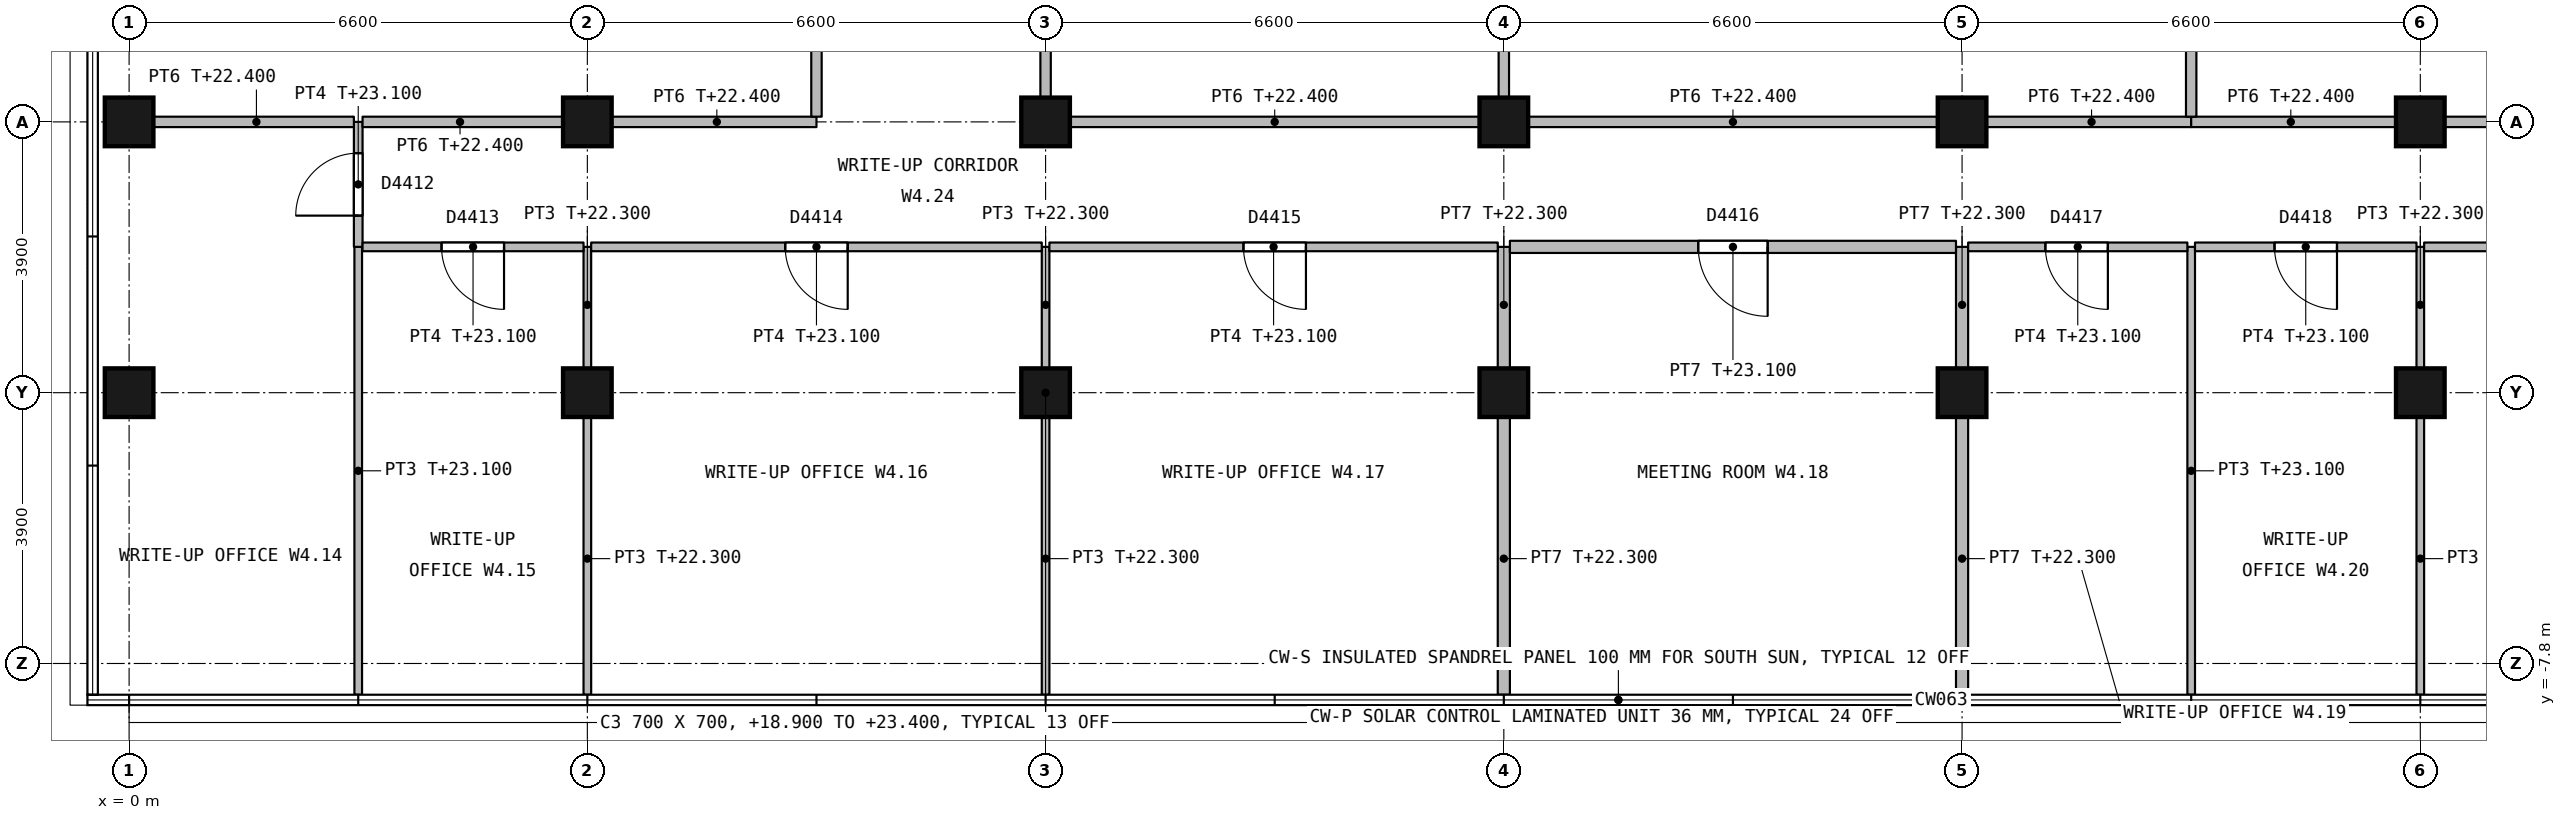
"""IFC4 building model, lengths in metres.
Left out: names, types, materials, properties, quantities, classifications, styles, units other than length and angle.
Written with IfcOpenShell. Run it as: python <this file> out.ifc"""

import sys

from ifc_helpers import new_model, si_unit, direction, frame, frame_2d, origin, origin_2d, place, context, subcontext, project, spatial, rectangle, extrude, element, fill, save


model = new_model("IFC4")
c1 = context("Model", 3, precision=1e-05, world=origin(), true_north=direction((0.0, 1.0)))
c2 = subcontext(c1, "Body", "Model", "MODEL_VIEW")
j1 = project(units=[si_unit("LENGTHUNIT", "METRE"), si_unit("PLANEANGLEUNIT", "RADIAN")], contexts=[c1])
p1 = place(None, origin())
s1 = spatial("IfcSite", under=j1, at=p1, CompositionType="ELEMENT")
p2 = place(p1, origin())
s2 = spatial("IfcBuilding", under=s1, at=p2, CompositionType="ELEMENT")
p3 = place(p2, frame((0.0, 0.0, 18.9)))
s3 = spatial("IfcBuildingStorey", under=s2, at=p3, CompositionType="ELEMENT", Elevation=18.9)
for number, where, z_axis, x_axis in (
    (1, (0.0, 0.0, 0.0), (0.0, 0.0, 1.0), (1.0, 0.0, 0.0)),
    (2, (6.6, 0.0, 0.0), (0.0, 0.0, 1.0), (1.0, 0.0, 0.0)),
    (3, (13.2, 0.0, 0.0), (0.0, 0.0, 1.0), (1.0, 0.0, 0.0)),
    (4, (19.8, 0.0, 0.0), (0.0, 0.0, 1.0), (1.0, 0.0, 0.0)),
    (5, (26.4, 0.0, 0.0), (0.0, 0.0, 1.0), (1.0, 0.0, 0.0)),
    (6, (33.0, 0.0, 0.0), (0.0, 0.0, 1.0), (1.0, 0.0, 0.0)),
    (7, (0.0, -3.9, 0.0), (0.0, 0.0, 1.0), (1.0, 0.0, 0.0)),
    (8, (6.6, -3.9, 0.0), (0.0, 0.0, 1.0), (1.0, 0.0, 0.0)),
    (9, (13.2, -3.9, 0.0), (0.0, 0.0, 1.0), (1.0, 0.0, 0.0)),
    (10, (19.8, -3.9, 0.0), (0.0, 0.0, 1.0), (1.0, 0.0, 0.0)),
    (11, (26.4, -3.9, 0.0), (0.0, 0.0, 1.0), (1.0, 0.0, 0.0)),
    (12, (33.0, -3.9, 0.0), (0.0, 0.0, 1.0), (1.0, 0.0, 0.0)),
):
    element("IfcColumn", number, at=place(p3, frame(where, z_axis=z_axis, x_axis=x_axis)), inside=s3, PredefinedType="COLUMN", context=c2, shape_type="SweptSolid", body=[
        extrude(rectangle(XDim=0.7, YDim=0.7, at=origin_2d()), origin(), (0.0, 0.0, 1.0), 4.5),
    ])
p4 = place(p3, frame((3.3, -8.25, 0.0), z_axis=(0.0, 0.0, 1.0), x_axis=(0.0, 1.0, 0.0)))
e13 = element("IfcWall", 13, at=p4, inside=s3, PredefinedType="PARTITIONING", context=c2, shape_type="SweptSolid", body=[
    extrude(rectangle(XDim=6.45, YDim=0.11, at=frame_2d((3.225, 0.0))), origin(), (0.0, 0.0, 1.0), 4.2),
])
p5 = place(p3, frame((3.3, -1.8, 0.0), z_axis=(0.0, 0.0, 1.0), x_axis=(0.0, 1.0, 0.0)))
e14 = element("IfcWall", 14, at=p5, inside=s3, PredefinedType="PARTITIONING", context=c2, shape_type="SweptSolid", body=[
    extrude(rectangle(XDim=1.8, YDim=0.125, at=frame_2d((0.9, 0.0))), origin(), (0.0, 0.0, 1.0), 4.2),
])
p6 = place(p5, frame((0.45, 0.0, 0.0)))
e15 = element("IfcOpeningElement", 15, at=p6, cuts=e14, PredefinedType="OPENING", context=c2, shape_type="SweptSolid", body=[
    extrude(rectangle(XDim=0.9, YDim=2.1, at=frame_2d((0.45, 1.05))), frame((0.0, 0.073, 0.0), z_axis=(0.0, -1.0, 0.0), x_axis=(1.0, 0.0, 0.0)), (0.0, 0.0, 1.0), 0.145),
])
p7 = place(p3, frame((3.238, 0.0, 0.0), z_axis=(0.0, 0.0, 1.0), x_axis=(-1.0, 0.0, 0.0)))
e16 = element("IfcWall", 16, at=p7, inside=s3, PredefinedType="PARTITIONING", context=c2, shape_type="SweptSolid", body=[
    extrude(rectangle(XDim=2.887, YDim=0.15, at=frame_2d((1.444, 0.0))), origin(), (0.0, 0.0, 1.0), 3.5),
])
p8 = place(p3, frame((6.6, -8.25, 0.0), z_axis=(0.0, 0.0, 1.0), x_axis=(0.0, 1.0, 0.0)))
e17 = element("IfcWall", 17, at=p8, inside=s3, PredefinedType="PARTITIONING", context=c2, shape_type="SweptSolid", body=[
    extrude(rectangle(XDim=4.0, YDim=0.11, at=frame_2d((2.0, 0.0))), origin(), (0.0, 0.0, 1.0), 3.4),
])
p9 = place(p3, frame((6.6, -3.55, 0.0), z_axis=(0.0, 0.0, 1.0), x_axis=(0.0, 1.0, 0.0)))
e18 = element("IfcWall", 18, at=p9, inside=s3, PredefinedType="PARTITIONING", context=c2, shape_type="SweptSolid", body=[
    extrude(rectangle(XDim=1.75, YDim=0.11, at=frame_2d((0.875, 0.0))), origin(), (0.0, 0.0, 1.0), 3.4),
])
p10 = place(p3, frame((6.545, -1.8, 0.0), z_axis=(0.0, 0.0, 1.0), x_axis=(-1.0, 0.0, 0.0)))
e19 = element("IfcWall", 19, at=p10, inside=s3, PredefinedType="PARTITIONING", context=c2, shape_type="SweptSolid", body=[
    extrude(rectangle(XDim=3.182, YDim=0.125, at=frame_2d((1.591, 0.0))), origin(), (0.0, 0.0, 1.0), 4.2),
])
p11 = place(p10, frame((1.145, 0.0, 0.0)))
e20 = element("IfcOpeningElement", 20, at=p11, cuts=e19, PredefinedType="OPENING", context=c2, shape_type="SweptSolid", body=[
    extrude(rectangle(XDim=0.9, YDim=2.1, at=frame_2d((0.45, 1.05))), frame((0.0, 0.073, 0.0), z_axis=(0.0, -1.0, 0.0), x_axis=(1.0, 0.0, 0.0)), (0.0, 0.0, 1.0), 0.145),
])
p12 = place(p3, frame((13.2, -8.25, 0.0), z_axis=(0.0, 0.0, 1.0), x_axis=(0.0, 1.0, 0.0)))
e21 = element("IfcWall", 21, at=p12, inside=s3, PredefinedType="PARTITIONING", context=c2, shape_type="SweptSolid", body=[
    extrude(rectangle(XDim=4.0, YDim=0.11, at=frame_2d((2.0, 0.0))), origin(), (0.0, 0.0, 1.0), 3.4),
])
p13 = place(p3, frame((13.2, -3.55, 0.0), z_axis=(0.0, 0.0, 1.0), x_axis=(0.0, 1.0, 0.0)))
e22 = element("IfcWall", 22, at=p13, inside=s3, PredefinedType="PARTITIONING", context=c2, shape_type="SweptSolid", body=[
    extrude(rectangle(XDim=1.75, YDim=0.11, at=frame_2d((0.875, 0.0))), origin(), (0.0, 0.0, 1.0), 3.4),
])
p14 = place(p3, frame((13.145, -1.8, 0.0), z_axis=(0.0, 0.0, 1.0), x_axis=(-1.0, 0.0, 0.0)))
e23 = element("IfcWall", 23, at=p14, inside=s3, PredefinedType="PARTITIONING", context=c2, shape_type="SweptSolid", body=[
    extrude(rectangle(XDim=6.49, YDim=0.125, at=frame_2d((3.245, 0.0))), origin(), (0.0, 0.0, 1.0), 4.2),
])
p15 = place(p14, frame((2.795, 0.0, 0.0)))
e24 = element("IfcOpeningElement", 24, at=p15, cuts=e23, PredefinedType="OPENING", context=c2, shape_type="SweptSolid", body=[
    extrude(rectangle(XDim=0.9, YDim=2.1, at=frame_2d((0.45, 1.05))), frame((0.0, 0.073, 0.0), z_axis=(0.0, -1.0, 0.0), x_axis=(1.0, 0.0, 0.0)), (0.0, 0.0, 1.0), 0.145),
])
p16 = place(p3, frame((19.8, -8.25, 0.0), z_axis=(0.0, 0.0, 1.0), x_axis=(0.0, 1.0, 0.0)))
e25 = element("IfcWall", 25, at=p16, inside=s3, PredefinedType="PARTITIONING", context=c2, shape_type="SweptSolid", body=[
    extrude(rectangle(XDim=4.0, YDim=0.175, at=frame_2d((2.0, 0.0))), origin(), (0.0, 0.0, 1.0), 3.4),
])
p17 = place(p3, frame((19.8, -3.55, 0.0), z_axis=(0.0, 0.0, 1.0), x_axis=(0.0, 1.0, 0.0)))
e26 = element("IfcWall", 26, at=p17, inside=s3, PredefinedType="PARTITIONING", context=c2, shape_type="SweptSolid", body=[
    extrude(rectangle(XDim=1.75, YDim=0.175, at=frame_2d((0.875, 0.0))), origin(), (0.0, 0.0, 1.0), 3.4),
])
p18 = place(p3, frame((19.712, -1.8, 0.0), z_axis=(0.0, 0.0, 1.0), x_axis=(-1.0, 0.0, 0.0)))
e27 = element("IfcWall", 27, at=p18, inside=s3, PredefinedType="PARTITIONING", context=c2, shape_type="SweptSolid", body=[
    extrude(rectangle(XDim=6.458, YDim=0.125, at=frame_2d((3.229, 0.0))), origin(), (0.0, 0.0, 1.0), 4.2),
])
p19 = place(p18, frame((2.762, 0.0, 0.0)))
e28 = element("IfcOpeningElement", 28, at=p19, cuts=e27, PredefinedType="OPENING", context=c2, shape_type="SweptSolid", body=[
    extrude(rectangle(XDim=0.9, YDim=2.1, at=frame_2d((0.45, 1.05))), frame((0.0, 0.073, 0.0), z_axis=(0.0, -1.0, 0.0), x_axis=(1.0, 0.0, 0.0)), (0.0, 0.0, 1.0), 0.145),
])
p20 = place(p3, frame((26.4, -8.25, 0.0), z_axis=(0.0, 0.0, 1.0), x_axis=(0.0, 1.0, 0.0)))
e29 = element("IfcWall", 29, at=p20, inside=s3, PredefinedType="PARTITIONING", context=c2, shape_type="SweptSolid", body=[
    extrude(rectangle(XDim=4.0, YDim=0.175, at=frame_2d((2.0, 0.0))), origin(), (0.0, 0.0, 1.0), 3.4),
])
p21 = place(p3, frame((26.4, -3.55, 0.0), z_axis=(0.0, 0.0, 1.0), x_axis=(0.0, 1.0, 0.0)))
e30 = element("IfcWall", 30, at=p21, inside=s3, PredefinedType="PARTITIONING", context=c2, shape_type="SweptSolid", body=[
    extrude(rectangle(XDim=1.75, YDim=0.175, at=frame_2d((0.875, 0.0))), origin(), (0.0, 0.0, 1.0), 3.4),
])
p22 = place(p3, frame((26.312, -1.8, 0.0), z_axis=(0.0, 0.0, 1.0), x_axis=(-1.0, 0.0, 0.0)))
e31 = element("IfcWall", 31, at=p22, inside=s3, PredefinedType="PARTITIONING", context=c2, shape_type="SweptSolid", body=[
    extrude(rectangle(XDim=6.425, YDim=0.175, at=frame_2d((3.212, 0.0))), origin(), (0.0, 0.0, 1.0), 4.2),
])
p23 = place(p22, frame((2.712, 0.0, 0.0)))
e32 = element("IfcOpeningElement", 32, at=p23, cuts=e31, PredefinedType="OPENING", context=c2, shape_type="SweptSolid", body=[
    extrude(rectangle(XDim=1.0, YDim=2.1, at=frame_2d((0.5, 1.05))), frame((0.0, 0.097, 0.0), z_axis=(0.0, -1.0, 0.0), x_axis=(1.0, 0.0, 0.0)), (0.0, 0.0, 1.0), 0.195),
])
p24 = place(p3, frame((29.7, -8.25, 0.0), z_axis=(0.0, 0.0, 1.0), x_axis=(0.0, 1.0, 0.0)))
e33 = element("IfcWall", 33, at=p24, inside=s3, PredefinedType="PARTITIONING", context=c2, shape_type="SweptSolid", body=[
    extrude(rectangle(XDim=6.45, YDim=0.11, at=frame_2d((3.225, 0.0))), origin(), (0.0, 0.0, 1.0), 4.2),
])
p25 = place(p3, frame((29.645, -1.8, 0.0), z_axis=(0.0, 0.0, 1.0), x_axis=(-1.0, 0.0, 0.0)))
e34 = element("IfcWall", 34, at=p25, inside=s3, PredefinedType="PARTITIONING", context=c2, shape_type="SweptSolid", body=[
    extrude(rectangle(XDim=3.157, YDim=0.125, at=frame_2d((1.579, 0.0))), origin(), (0.0, 0.0, 1.0), 4.2),
])
p26 = place(p25, frame((1.145, 0.0, 0.0)))
e35 = element("IfcOpeningElement", 35, at=p26, cuts=e34, PredefinedType="OPENING", context=c2, shape_type="SweptSolid", body=[
    extrude(rectangle(XDim=0.9, YDim=2.1, at=frame_2d((0.45, 1.05))), frame((0.0, 0.073, 0.0), z_axis=(0.0, -1.0, 0.0), x_axis=(1.0, 0.0, 0.0)), (0.0, 0.0, 1.0), 0.145),
])
p27 = place(p3, frame((33.0, -8.25, 0.0), z_axis=(0.0, 0.0, 1.0), x_axis=(0.0, 1.0, 0.0)))
e36 = element("IfcWall", 36, at=p27, inside=s3, PredefinedType="PARTITIONING", context=c2, shape_type="SweptSolid", body=[
    extrude(rectangle(XDim=4.0, YDim=0.11, at=frame_2d((2.0, 0.0))), origin(), (0.0, 0.0, 1.0), 3.4),
])
p28 = place(p3, frame((33.0, -3.55, 0.0), z_axis=(0.0, 0.0, 1.0), x_axis=(0.0, 1.0, 0.0)))
e37 = element("IfcWall", 37, at=p28, inside=s3, PredefinedType="PARTITIONING", context=c2, shape_type="SweptSolid", body=[
    extrude(rectangle(XDim=1.75, YDim=0.11, at=frame_2d((0.875, 0.0))), origin(), (0.0, 0.0, 1.0), 3.4),
])
p29 = place(p3, frame((32.945, -1.8, 0.0), z_axis=(0.0, 0.0, 1.0), x_axis=(-1.0, 0.0, 0.0)))
e38 = element("IfcWall", 38, at=p29, inside=s3, PredefinedType="PARTITIONING", context=c2, shape_type="SweptSolid", body=[
    extrude(rectangle(XDim=3.19, YDim=0.125, at=frame_2d((1.595, 0.0))), origin(), (0.0, 0.0, 1.0), 4.2),
])
p30 = place(p29, frame((1.145, 0.0, 0.0)))
e39 = element("IfcOpeningElement", 39, at=p30, cuts=e38, PredefinedType="OPENING", context=c2, shape_type="SweptSolid", body=[
    extrude(rectangle(XDim=0.9, YDim=2.1, at=frame_2d((0.45, 1.05))), frame((0.0, 0.073, 0.0), z_axis=(0.0, -1.0, 0.0), x_axis=(1.0, 0.0, 0.0)), (0.0, 0.0, 1.0), 0.145),
])
p31 = place(p3, frame((39.545, -1.8, 0.0), z_axis=(0.0, 0.0, 1.0), x_axis=(-1.0, 0.0, 0.0)))
e40 = element("IfcWall", 40, at=p31, inside=s3, PredefinedType="PARTITIONING", context=c2, shape_type="SweptSolid", body=[
    extrude(rectangle(XDim=6.49, YDim=0.125, at=frame_2d((3.245, 0.0))), origin(), (0.0, 0.0, 1.0), 4.2),
])
p32 = place(p31, frame((2.795, 0.0, 0.0)))
e41 = element("IfcOpeningElement", 41, at=p32, cuts=e40, PredefinedType="OPENING", context=c2, shape_type="SweptSolid", body=[
    extrude(rectangle(XDim=0.9, YDim=2.1, at=frame_2d((0.45, 1.05))), frame((0.0, 0.073, 0.0), z_axis=(0.0, -1.0, 0.0), x_axis=(1.0, 0.0, 0.0)), (0.0, 0.0, 1.0), 0.145),
])
p33 = place(p3, frame((9.9, 0.0, 0.0), z_axis=(0.0, 0.0, 1.0), x_axis=(-1.0, 0.0, 0.0)))
e42 = element("IfcWall", 42, at=p33, inside=s3, PredefinedType="PARTITIONING", context=c2, shape_type="SweptSolid", body=[
    extrude(rectangle(XDim=2.95, YDim=0.15, at=frame_2d((1.475, 0.0))), origin(), (0.0, 0.0, 1.0), 3.5),
])
p34 = place(p3, frame((6.25, 0.0, 0.0), z_axis=(0.0, 0.0, 1.0), x_axis=(-1.0, 0.0, 0.0)))
e43 = element("IfcWall", 43, at=p34, inside=s3, PredefinedType="PARTITIONING", context=c2, shape_type="SweptSolid", body=[
    extrude(rectangle(XDim=2.887, YDim=0.15, at=frame_2d((1.444, 0.0))), origin(), (0.0, 0.0, 1.0), 3.5),
])
p35 = place(p3, frame((19.45, 0.0, 0.0), z_axis=(0.0, 0.0, 1.0), x_axis=(-1.0, 0.0, 0.0)))
e44 = element("IfcWall", 44, at=p35, inside=s3, PredefinedType="PARTITIONING", context=c2, shape_type="SweptSolid", body=[
    extrude(rectangle(XDim=5.9, YDim=0.15, at=frame_2d((2.95, 0.0))), origin(), (0.0, 0.0, 1.0), 3.5),
])
p36 = place(p3, frame((29.7, 0.0, 0.0), z_axis=(0.0, 0.0, 1.0), x_axis=(-1.0, 0.0, 0.0)))
e45 = element("IfcWall", 45, at=p36, inside=s3, PredefinedType="PARTITIONING", context=c2, shape_type="SweptSolid", body=[
    extrude(rectangle(XDim=2.95, YDim=0.15, at=frame_2d((1.475, 0.0))), origin(), (0.0, 0.0, 1.0), 3.5),
])
p37 = place(p3, frame((26.05, 0.0, 0.0), z_axis=(0.0, 0.0, 1.0), x_axis=(-1.0, 0.0, 0.0)))
e46 = element("IfcWall", 46, at=p37, inside=s3, PredefinedType="PARTITIONING", context=c2, shape_type="SweptSolid", body=[
    extrude(rectangle(XDim=5.9, YDim=0.15, at=frame_2d((2.95, 0.0))), origin(), (0.0, 0.0, 1.0), 3.5),
])
p38 = place(p3, frame((39.25, 0.0, 0.0), z_axis=(0.0, 0.0, 1.0), x_axis=(-1.0, 0.0, 0.0)))
e47 = element("IfcWall", 47, at=p38, inside=s3, PredefinedType="PARTITIONING", context=c2, shape_type="SweptSolid", body=[
    extrude(rectangle(XDim=5.9, YDim=0.15, at=frame_2d((2.95, 0.0))), origin(), (0.0, 0.0, 1.0), 3.5),
])
p39 = place(p3, frame((32.65, 0.0, 0.0), z_axis=(0.0, 0.0, 1.0), x_axis=(-1.0, 0.0, 0.0)))
e48 = element("IfcWall", 48, at=p39, inside=s3, PredefinedType="PARTITIONING", context=c2, shape_type="SweptSolid", body=[
    extrude(rectangle(XDim=2.95, YDim=0.15, at=frame_2d((1.475, 0.0))), origin(), (0.0, 0.0, 1.0), 3.5),
])
p40 = place(p3, frame((9.9, 0.075, 0.0), z_axis=(0.0, 0.0, 1.0), x_axis=(0.0, 1.0, 0.0)))
e49 = element("IfcWall", 49, at=p40, inside=s3, PredefinedType="PARTITIONING", context=c2, shape_type="SweptSolid", body=[
    extrude(rectangle(XDim=9.75, YDim=0.15, at=frame_2d((4.875, 0.0))), origin(), (0.0, 0.0, 1.0), 4.2),
])
p41 = place(p3, frame((13.2, 0.35, 0.0), z_axis=(0.0, 0.0, 1.0), x_axis=(0.0, 1.0, 0.0)))
e50 = element("IfcWall", 50, at=p41, inside=s3, PredefinedType="PARTITIONING", context=c2, shape_type="SweptSolid", body=[
    extrude(rectangle(XDim=9.2, YDim=0.15, at=frame_2d((4.6, 0.0))), origin(), (0.0, 0.0, 1.0), 3.3),
])
p42 = place(p41, frame((3.7, 0.0, 0.0)))
e51 = element("IfcOpeningElement", 51, at=p42, cuts=e50, PredefinedType="OPENING", context=c2, shape_type="SweptSolid", body=[
    extrude(rectangle(XDim=1.8, YDim=2.4, at=frame_2d((0.9, 1.2))), frame((0.0, 0.085, 0.0), z_axis=(0.0, -1.0, 0.0), x_axis=(1.0, 0.0, 0.0)), (0.0, 0.0, 1.0), 0.17),
])
p43 = place(p3, frame((19.8, 0.35, 0.0), z_axis=(0.0, 0.0, 1.0), x_axis=(0.0, 1.0, 0.0)))
e52 = element("IfcWall", 52, at=p43, inside=s3, PredefinedType="PARTITIONING", context=c2, shape_type="SweptSolid", body=[
    extrude(rectangle(XDim=9.2, YDim=0.15, at=frame_2d((4.6, 0.0))), origin(), (0.0, 0.0, 1.0), 3.3),
])
p44 = place(p3, frame((29.7, 0.075, 0.0), z_axis=(0.0, 0.0, 1.0), x_axis=(0.0, 1.0, 0.0)))
e53 = element("IfcWall", 53, at=p44, inside=s3, PredefinedType="PARTITIONING", context=c2, shape_type="SweptSolid", body=[
    extrude(rectangle(XDim=9.75, YDim=0.15, at=frame_2d((4.875, 0.0))), origin(), (0.0, 0.0, 1.0), 4.2),
])
p45 = place(p6, origin())
e54 = element("IfcDoor", 54, at=p45, inside=s3, OperationType="SINGLE_SWING_LEFT", PredefinedType="DOOR", context=c2, shape_type="SweptSolid", body=[
    extrude(rectangle(XDim=0.9, YDim=2.1, at=frame_2d((0.45, 1.05))), frame((0.0, 0.027, 0.0), z_axis=(0.0, -1.0, 0.0), x_axis=(1.0, 0.0, 0.0)), (0.0, 0.0, 1.0), 0.054),
])
fill(e15, e54)
p46 = place(p11, origin())
e55 = element("IfcDoor", 55, at=p46, inside=s3, OperationType="SINGLE_SWING_LEFT", PredefinedType="DOOR", context=c2, shape_type="SweptSolid", body=[
    extrude(rectangle(XDim=0.9, YDim=2.1, at=frame_2d((0.45, 1.05))), frame((0.0, 0.027, 0.0), z_axis=(0.0, -1.0, 0.0), x_axis=(1.0, 0.0, 0.0)), (0.0, 0.0, 1.0), 0.054),
])
fill(e20, e55)
p47 = place(p15, origin())
e56 = element("IfcDoor", 56, at=p47, inside=s3, OperationType="SINGLE_SWING_LEFT", PredefinedType="DOOR", context=c2, shape_type="SweptSolid", body=[
    extrude(rectangle(XDim=0.9, YDim=2.1, at=frame_2d((0.45, 1.05))), frame((0.0, 0.027, 0.0), z_axis=(0.0, -1.0, 0.0), x_axis=(1.0, 0.0, 0.0)), (0.0, 0.0, 1.0), 0.054),
])
fill(e24, e56)
p48 = place(p19, origin())
e57 = element("IfcDoor", 57, at=p48, inside=s3, OperationType="SINGLE_SWING_LEFT", PredefinedType="DOOR", context=c2, shape_type="SweptSolid", body=[
    extrude(rectangle(XDim=0.9, YDim=2.1, at=frame_2d((0.45, 1.05))), frame((0.0, 0.027, 0.0), z_axis=(0.0, -1.0, 0.0), x_axis=(1.0, 0.0, 0.0)), (0.0, 0.0, 1.0), 0.054),
])
fill(e28, e57)
p49 = place(p23, origin())
e58 = element("IfcDoor", 58, at=p49, inside=s3, OperationType="SINGLE_SWING_LEFT", PredefinedType="DOOR", context=c2, shape_type="SweptSolid", body=[
    extrude(rectangle(XDim=1.0, YDim=2.1, at=frame_2d((0.5, 1.05))), frame((0.0, 0.027, 0.0), z_axis=(0.0, -1.0, 0.0), x_axis=(1.0, 0.0, 0.0)), (0.0, 0.0, 1.0), 0.054),
])
fill(e32, e58)
p50 = place(p26, origin())
e59 = element("IfcDoor", 59, at=p50, inside=s3, OperationType="SINGLE_SWING_LEFT", PredefinedType="DOOR", context=c2, shape_type="SweptSolid", body=[
    extrude(rectangle(XDim=0.9, YDim=2.1, at=frame_2d((0.45, 1.05))), frame((0.0, 0.027, 0.0), z_axis=(0.0, -1.0, 0.0), x_axis=(1.0, 0.0, 0.0)), (0.0, 0.0, 1.0), 0.054),
])
fill(e35, e59)
p51 = place(p30, origin())
e60 = element("IfcDoor", 60, at=p51, inside=s3, OperationType="SINGLE_SWING_LEFT", PredefinedType="DOOR", context=c2, shape_type="SweptSolid", body=[
    extrude(rectangle(XDim=0.9, YDim=2.1, at=frame_2d((0.45, 1.05))), frame((0.0, 0.027, 0.0), z_axis=(0.0, -1.0, 0.0), x_axis=(1.0, 0.0, 0.0)), (0.0, 0.0, 1.0), 0.054),
])
fill(e39, e60)
save(model, sys.argv[1])
